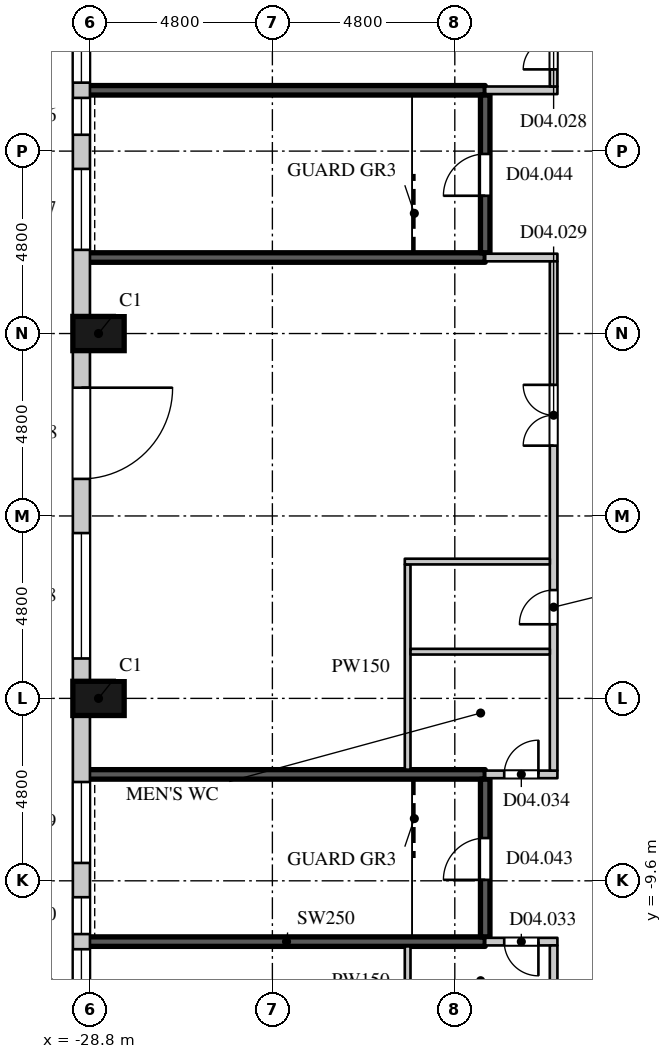
"""IFC4 building model, lengths in metres.
Left out: names, types, materials, properties, quantities, classifications, styles, units other than length and angle.
Written with IfcOpenShell. Run it as: python <this file> out.ifc"""

import sys

from ifc_helpers import new_model, si_unit, direction, frame, frame_2d, origin, origin_2d, place, context, subcontext, project, spatial, rectangle, extrude, element, fill, save


model = new_model("IFC4")
c1 = context("Model", 3, precision=1e-05, world=origin(), true_north=direction((0.0, 1.0)))
c2 = subcontext(c1, "Body", "Model", "MODEL_VIEW")
j1 = project(units=[si_unit("LENGTHUNIT", "METRE"), si_unit("PLANEANGLEUNIT", "RADIAN")], contexts=[c1])
p1 = place(None, origin())
s1 = spatial("IfcSite", under=j1, at=p1, CompositionType="ELEMENT")
p2 = place(p1, origin())
s2 = spatial("IfcBuilding", under=s1, at=p2, CompositionType="ELEMENT")
p3 = place(p2, frame((0.0, 0.0, 21.0)))
s3 = spatial("IfcBuildingStorey", under=s2, at=p3, CompositionType="ELEMENT", Elevation=21.0)
for number, where, z_axis, x_axis in (
    (1, (-28.575, 4.8, 0.0), (0.0, 0.0, 1.0), (0.0, -1.0, 0.0)),
    (2, (-28.575, -4.8, 0.0), (0.0, 0.0, 1.0), (0.0, -1.0, 0.0)),
):
    element("IfcColumn", number, at=place(p3, frame(where, z_axis=z_axis, x_axis=x_axis)), inside=s3, PredefinedType="COLUMN", context=c2, shape_type="SweptSolid", body=[
        extrude(rectangle(XDim=0.9, YDim=1.35, at=origin_2d()), origin(), (0.0, 0.0, 1.0), 4.5),
    ])
p4 = place(p3, frame((-29.025, 13.913, 0.9), z_axis=(0.0, 0.0, 1.0), x_axis=(0.0, -1.0, 0.0)))
e3 = element("IfcWall", 3, at=p4, inside=s3, PredefinedType="ELEMENTEDWALL", context=c2, shape_type="SweptSolid", body=[
    extrude(rectangle(XDim=8.663, YDim=0.45, at=frame_2d((4.332, 0.0))), origin(), (0.0, 0.0, 1.0), 3.3),
])
p5 = place(p4, frame((0.582, 0.0, 0.15)))
e4 = element("IfcOpeningElement", 4, at=p5, cuts=e3, PredefinedType="OPENING", context=c2, shape_type="SweptSolid", body=[
    extrude(rectangle(XDim=1.93, YDim=2.7, at=frame_2d((0.965, 1.35))), frame((0.0, 0.235, 0.0), z_axis=(0.0, -1.0, 0.0), x_axis=(1.0, 0.0, 0.0)), (0.0, 0.0, 1.0), 0.47),
])
p6 = place(p4, frame((2.913, 0.0, 0.15)))
e5 = element("IfcOpeningElement", 5, at=p6, cuts=e3, PredefinedType="OPENING", context=c2, shape_type="SweptSolid", body=[
    extrude(rectangle(XDim=0.97, YDim=2.7, at=frame_2d((0.485, 1.35))), frame((0.0, 0.235, 0.0), z_axis=(0.0, -1.0, 0.0), x_axis=(1.0, 0.0, 0.0)), (0.0, 0.0, 1.0), 0.47),
])
p7 = place(p4, frame((4.781, 0.0, 0.15)))
e6 = element("IfcOpeningElement", 6, at=p7, cuts=e3, PredefinedType="OPENING", context=c2, shape_type="SweptSolid", body=[
    extrude(rectangle(XDim=2.13, YDim=2.7, at=frame_2d((1.065, 1.35))), frame((0.0, 0.235, 0.0), z_axis=(0.0, -1.0, 0.0), x_axis=(1.0, 0.0, 0.0)), (0.0, 0.0, 1.0), 0.47),
])
p8 = place(p3, frame((-29.025, 4.35, 0.0), z_axis=(0.0, 0.0, 1.0), x_axis=(0.0, -1.0, 0.0)))
e7 = element("IfcWall", 7, at=p8, inside=s3, PredefinedType="ELEMENTEDWALL", context=c2, shape_type="SweptSolid", body=[
    extrude(rectangle(XDim=8.7, YDim=0.45, at=frame_2d((4.35, 0.0))), origin(), (0.0, 0.0, 1.0), 4.2),
])
p9 = place(p8, frame((0.975, 0.0, 0.0)))
e8 = element("IfcOpeningElement", 8, at=p9, cuts=e7, PredefinedType="OPENING", context=c2, shape_type="SweptSolid", body=[
    extrude(rectangle(XDim=2.4, YDim=2.7, at=frame_2d((1.2, 1.35))), frame((0.0, 0.235, 0.0), z_axis=(0.0, -1.0, 0.0), x_axis=(1.0, 0.0, 0.0)), (0.0, 0.0, 1.0), 0.47),
])
p10 = place(p8, frame((4.8, 0.0, 1.05)))
e9 = element("IfcOpeningElement", 9, at=p10, cuts=e7, PredefinedType="OPENING", context=c2, shape_type="SweptSolid", body=[
    extrude(rectangle(XDim=3.3, YDim=2.7, at=frame_2d((1.65, 1.35))), frame((0.0, 0.235, 0.0), z_axis=(0.0, -1.0, 0.0), x_axis=(1.0, 0.0, 0.0)), (0.0, 0.0, 1.0), 0.47),
])
p11 = place(p3, frame((-29.025, -5.25, 0.9), z_axis=(0.0, 0.0, 1.0), x_axis=(0.0, -1.0, 0.0)))
e10 = element("IfcWall", 10, at=p11, inside=s3, PredefinedType="ELEMENTEDWALL", context=c2, shape_type="SweptSolid", body=[
    extrude(rectangle(XDim=8.663, YDim=0.45, at=frame_2d((4.332, 0.0))), origin(), (0.0, 0.0, 1.0), 3.3),
])
p12 = place(p11, frame((1.75, 0.0, 0.15)))
e11 = element("IfcOpeningElement", 11, at=p12, cuts=e10, PredefinedType="OPENING", context=c2, shape_type="SweptSolid", body=[
    extrude(rectangle(XDim=2.13, YDim=2.7, at=frame_2d((1.065, 1.35))), frame((0.0, 0.235, 0.0), z_axis=(0.0, -1.0, 0.0), x_axis=(1.0, 0.0, 0.0)), (0.0, 0.0, 1.0), 0.47),
])
p13 = place(p11, frame((4.781, 0.0, 0.15)))
e12 = element("IfcOpeningElement", 12, at=p13, cuts=e10, PredefinedType="OPENING", context=c2, shape_type="SweptSolid", body=[
    extrude(rectangle(XDim=0.97, YDim=2.7, at=frame_2d((0.485, 1.35))), frame((0.0, 0.235, 0.0), z_axis=(0.0, -1.0, 0.0), x_axis=(1.0, 0.0, 0.0)), (0.0, 0.0, 1.0), 0.47),
])
p14 = place(p11, frame((6.15, 0.0, 0.15)))
e13 = element("IfcOpeningElement", 13, at=p14, cuts=e10, PredefinedType="OPENING", context=c2, shape_type="SweptSolid", body=[
    extrude(rectangle(XDim=1.93, YDim=2.7, at=frame_2d((0.965, 1.35))), frame((0.0, 0.235, 0.0), z_axis=(0.0, -1.0, 0.0), x_axis=(1.0, 0.0, 0.0)), (0.0, 0.0, 1.0), 0.47),
])
p15 = place(p3, frame((-18.4, -11.2, 0.0), z_axis=(0.0, 0.0, 1.0), x_axis=(1.0, 0.0, 0.0)))
e14 = element("IfcWall", 14, at=p15, inside=s3, PredefinedType="PARTITIONING", context=c2, shape_type="SweptSolid", body=[
    extrude(rectangle(XDim=1.9, YDim=0.2, at=frame_2d((0.95, 0.0))), origin(), (0.0, 0.0, 1.0), 3.55),
])
p16 = place(p15, frame((0.5, 0.0, 0.0)))
e15 = element("IfcOpeningElement", 15, at=p16, cuts=e14, PredefinedType="OPENING", context=c2, shape_type="SweptSolid", body=[
    extrude(rectangle(XDim=0.9, YDim=2.2, at=frame_2d((0.45, 1.1))), frame((0.0, 0.11, 0.0), z_axis=(0.0, -1.0, 0.0), x_axis=(1.0, 0.0, 0.0)), (0.0, 0.0, 1.0), 0.22),
])
p17 = place(p3, frame((-18.4, -6.8, 0.0), z_axis=(0.0, 0.0, 1.0), x_axis=(1.0, 0.0, 0.0)))
e16 = element("IfcWall", 16, at=p17, inside=s3, PredefinedType="PARTITIONING", context=c2, shape_type="SweptSolid", body=[
    extrude(rectangle(XDim=1.9, YDim=0.2, at=frame_2d((0.95, 0.0))), origin(), (0.0, 0.0, 1.0), 4.25),
])
p18 = place(p17, frame((0.5, 0.0, 0.0)))
e17 = element("IfcOpeningElement", 17, at=p18, cuts=e16, PredefinedType="OPENING", context=c2, shape_type="SweptSolid", body=[
    extrude(rectangle(XDim=0.9, YDim=2.2, at=frame_2d((0.45, 1.1))), frame((0.0, 0.11, 0.0), z_axis=(0.0, -1.0, 0.0), x_axis=(1.0, 0.0, 0.0)), (0.0, 0.0, 1.0), 0.22),
])
p19 = place(p3, frame((-18.4, 6.8, 0.0), z_axis=(0.0, 0.0, 1.0), x_axis=(1.0, 0.0, 0.0)))
e18 = element("IfcWall", 18, at=p19, inside=s3, PredefinedType="PARTITIONING", context=c2, shape_type="SweptSolid", body=[
    extrude(rectangle(XDim=1.9, YDim=0.2, at=frame_2d((0.95, 0.0))), origin(), (0.0, 0.0, 1.0), 4.25),
])
p20 = place(p3, frame((-18.4, 11.2, 0.0), z_axis=(0.0, 0.0, 1.0), x_axis=(1.0, 0.0, 0.0)))
e19 = element("IfcWall", 19, at=p20, inside=s3, PredefinedType="PARTITIONING", context=c2, shape_type="SweptSolid", body=[
    extrude(rectangle(XDim=1.9, YDim=0.2, at=frame_2d((0.95, 0.0))), origin(), (0.0, 0.0, 1.0), 3.55),
])
p21 = place(p3, frame((-16.6, -13.914, 0.0), z_axis=(0.0, 0.0, 1.0), x_axis=(0.0, 1.0, 0.0)))
e20 = element("IfcWall", 20, at=p21, inside=s3, PredefinedType="PARTITIONING", context=c2, shape_type="SweptSolid", body=[
    extrude(rectangle(XDim=2.614, YDim=0.2, at=frame_2d((1.307, 0.0))), origin(), (0.0, 0.0, 1.0), 4.25),
])
p22 = place(p3, frame((-16.6, -6.7, 0.0), z_axis=(0.0, 0.0, 1.0), x_axis=(0.0, 1.0, 0.0)))
e21 = element("IfcWall", 21, at=p22, inside=s3, PredefinedType="PARTITIONING", context=c2, shape_type="SweptSolid", body=[
    extrude(rectangle(XDim=13.4, YDim=0.2, at=frame_2d((6.7, 0.0))), origin(), (0.0, 0.0, 1.0), 4.25),
])
p23 = place(p22, frame((8.55, 0.0, 0.0)))
e22 = element("IfcOpeningElement", 22, at=p23, cuts=e21, PredefinedType="OPENING", context=c2, shape_type="SweptSolid", body=[
    extrude(rectangle(XDim=1.6, YDim=2.4, at=frame_2d((0.8, 1.2))), frame((0.0, 0.11, 0.0), z_axis=(0.0, -1.0, 0.0), x_axis=(1.0, 0.0, 0.0)), (0.0, 0.0, 1.0), 0.22),
])
p24 = place(p22, frame((3.85, 0.0, 0.0)))
e23 = element("IfcOpeningElement", 23, at=p24, cuts=e21, PredefinedType="OPENING", context=c2, shape_type="SweptSolid", body=[
    extrude(rectangle(XDim=0.9, YDim=2.2, at=frame_2d((0.45, 1.1))), frame((0.0, 0.11, 0.0), z_axis=(0.0, -1.0, 0.0), x_axis=(1.0, 0.0, 0.0)), (0.0, 0.0, 1.0), 0.22),
])
p25 = place(p3, frame((-16.6, 11.3, 0.0), z_axis=(0.0, 0.0, 1.0), x_axis=(0.0, 1.0, 0.0)))
e24 = element("IfcWall", 24, at=p25, inside=s3, PredefinedType="PARTITIONING", context=c2, shape_type="SweptSolid", body=[
    extrude(rectangle(XDim=2.513, YDim=0.2, at=frame_2d((1.257, 0.0))), origin(), (0.0, 0.0, 1.0), 4.25),
])
p26 = place(p25, frame((0.45, 0.0, 0.0)))
e25 = element("IfcOpeningElement", 25, at=p26, cuts=e24, PredefinedType="OPENING", context=c2, shape_type="SweptSolid", body=[
    extrude(rectangle(XDim=1.6, YDim=2.4, at=frame_2d((0.8, 1.2))), frame((0.0, 0.11, 0.0), z_axis=(0.0, -1.0, 0.0), x_axis=(1.0, 0.0, 0.0)), (0.0, 0.0, 1.0), 0.22),
])
p27 = place(p3, frame((-20.441, -13.182, 0.0), z_axis=(0.0, 0.0, 1.0), x_axis=(0.0, 1.0, 0.0)))
e26 = element("IfcWall", 26, at=p27, inside=s3, PredefinedType="PARTITIONING", context=c2, shape_type="SweptSolid", body=[
    extrude(rectangle(XDim=1.857, YDim=0.15, at=frame_2d((0.928, 0.0))), origin(), (0.0, 0.0, 1.0), 4.25),
])
p28 = place(p3, frame((-20.441, -6.675, 0.0), z_axis=(0.0, 0.0, 1.0), x_axis=(0.0, 1.0, 0.0)))
e27 = element("IfcWall", 27, at=p28, inside=s3, PredefinedType="PARTITIONING", context=c2, shape_type="SweptSolid", body=[
    extrude(rectangle(XDim=5.4, YDim=0.15, at=frame_2d((2.7, 0.0))), origin(), (0.0, 0.0, 1.0), 4.25),
])
p29 = place(p3, frame((-20.366, -3.571, 0.0), z_axis=(0.0, 0.0, 1.0), x_axis=(1.0, 0.0, 0.0)))
e28 = element("IfcWall", 28, at=p29, inside=s3, PredefinedType="PARTITIONING", context=c2, shape_type="SweptSolid", body=[
    extrude(rectangle(XDim=3.666, YDim=0.15, at=frame_2d((1.833, 0.0))), origin(), (0.0, 0.0, 1.0), 4.25),
])
p30 = place(p3, frame((-20.516, -1.2, 0.0), z_axis=(0.0, 0.0, 1.0), x_axis=(1.0, 0.0, 0.0)))
e29 = element("IfcWall", 29, at=p30, inside=s3, PredefinedType="PARTITIONING", context=c2, shape_type="SweptSolid", body=[
    extrude(rectangle(XDim=3.816, YDim=0.15, at=frame_2d((1.908, 0.0))), origin(), (0.0, 0.0, 1.0), 4.25),
])
for number, where, z_axis, x_axis in (
    (30, (-28.855, -11.2, 0.0), (0.0, 0.0, 1.0), (1.0, 0.0, 0.0)),
    (31, (-28.855, -6.8, 0.0), (0.0, 0.0, 1.0), (1.0, 0.0, 0.0)),
    (32, (-28.855, 6.8, 0.0), (0.0, 0.0, 1.0), (1.0, 0.0, 0.0)),
    (33, (-28.855, 11.2, 0.0), (0.0, 0.0, 1.0), (1.0, 0.0, 0.0)),
):
    element("IfcWall", number, at=place(p3, frame(where, z_axis=z_axis, x_axis=x_axis)), inside=s3, PredefinedType="SHEAR", context=c2, shape_type="SweptSolid", body=[
        extrude(rectangle(XDim=10.455, YDim=0.25, at=frame_2d((5.228, 0.0))), origin(), (0.0, 0.0, 1.0), 4.25),
    ])
p31 = place(p3, frame((-18.4, -11.075, 0.0), z_axis=(0.0, 0.0, 1.0), x_axis=(0.0, 1.0, 0.0)))
e34 = element("IfcWall", 34, at=p31, inside=s3, PredefinedType="SHEAR", context=c2, shape_type="SweptSolid", body=[
    extrude(rectangle(XDim=4.15, YDim=0.25, at=frame_2d((2.075, 0.0))), origin(), (0.0, 0.0, 1.0), 4.25),
])
p32 = place(p31, frame((1.5, 0.0, 0.0)))
e35 = element("IfcOpeningElement", 35, at=p32, cuts=e34, PredefinedType="OPENING", context=c2, shape_type="SweptSolid", body=[
    extrude(rectangle(XDim=1.1, YDim=2.2, at=frame_2d((0.55, 1.1))), frame((0.0, 0.135, 0.0), z_axis=(0.0, -1.0, 0.0), x_axis=(1.0, 0.0, 0.0)), (0.0, 0.0, 1.0), 0.27),
])
p33 = place(p3, frame((-18.4, 6.925, 0.0), z_axis=(0.0, 0.0, 1.0), x_axis=(0.0, 1.0, 0.0)))
e36 = element("IfcWall", 36, at=p33, inside=s3, PredefinedType="SHEAR", context=c2, shape_type="SweptSolid", body=[
    extrude(rectangle(XDim=4.15, YDim=0.25, at=frame_2d((2.075, 0.0))), origin(), (0.0, 0.0, 1.0), 4.25),
])
p34 = place(p33, frame((1.5, 0.0, 0.0)))
e37 = element("IfcOpeningElement", 37, at=p34, cuts=e36, PredefinedType="OPENING", context=c2, shape_type="SweptSolid", body=[
    extrude(rectangle(XDim=1.1, YDim=2.2, at=frame_2d((0.55, 1.1))), frame((0.0, 0.135, 0.0), z_axis=(0.0, -1.0, 0.0), x_axis=(1.0, 0.0, 0.0)), (0.0, 0.0, 1.0), 0.27),
])
p35 = place(p5, origin())
e38 = element("IfcWindow", 38, at=p35, inside=s3, PartitioningType="SINGLE_PANEL", PredefinedType="WINDOW", context=c2, shape_type="SweptSolid", body=[
    extrude(rectangle(XDim=1.93, YDim=2.7, at=frame_2d((0.965, 1.35))), frame((0.0, 0.135, 0.0), z_axis=(0.0, -1.0, 0.0), x_axis=(1.0, 0.0, 0.0)), (0.0, 0.0, 1.0), 0.06),
])
fill(e4, e38)
p36 = place(p6, origin())
e39 = element("IfcWindow", 39, at=p36, inside=s3, PartitioningType="SINGLE_PANEL", PredefinedType="WINDOW", context=c2, shape_type="SweptSolid", body=[
    extrude(rectangle(XDim=0.97, YDim=2.7, at=frame_2d((0.485, 1.35))), frame((0.0, 0.135, 0.0), z_axis=(0.0, -1.0, 0.0), x_axis=(1.0, 0.0, 0.0)), (0.0, 0.0, 1.0), 0.06),
])
fill(e5, e39)
p37 = place(p7, origin())
e40 = element("IfcWindow", 40, at=p37, inside=s3, PartitioningType="SINGLE_PANEL", PredefinedType="WINDOW", context=c2, shape_type="SweptSolid", body=[
    extrude(rectangle(XDim=2.13, YDim=2.7, at=frame_2d((1.065, 1.35))), frame((0.0, 0.135, 0.0), z_axis=(0.0, -1.0, 0.0), x_axis=(1.0, 0.0, 0.0)), (0.0, 0.0, 1.0), 0.06),
])
fill(e6, e40)
p38 = place(p9, origin())
e41 = element("IfcDoor", 41, at=p38, inside=s3, OperationType="SINGLE_SWING_LEFT", PredefinedType="DOOR", context=c2, shape_type="SweptSolid", body=[
    extrude(rectangle(XDim=2.4, YDim=2.7, at=frame_2d((1.2, 1.35))), frame((0.0, 0.13, 0.0), z_axis=(0.0, -1.0, 0.0), x_axis=(1.0, 0.0, 0.0)), (0.0, 0.0, 1.0), 0.05),
])
fill(e8, e41)
p39 = place(p10, origin())
e42 = element("IfcWindow", 42, at=p39, inside=s3, PartitioningType="SINGLE_PANEL", PredefinedType="WINDOW", context=c2, shape_type="SweptSolid", body=[
    extrude(rectangle(XDim=3.3, YDim=2.7, at=frame_2d((1.65, 1.35))), frame((0.0, 0.135, 0.0), z_axis=(0.0, -1.0, 0.0), x_axis=(1.0, 0.0, 0.0)), (0.0, 0.0, 1.0), 0.06),
])
fill(e9, e42)
p40 = place(p12, origin())
e43 = element("IfcWindow", 43, at=p40, inside=s3, PartitioningType="SINGLE_PANEL", PredefinedType="WINDOW", context=c2, shape_type="SweptSolid", body=[
    extrude(rectangle(XDim=2.13, YDim=2.7, at=frame_2d((1.065, 1.35))), frame((0.0, 0.135, 0.0), z_axis=(0.0, -1.0, 0.0), x_axis=(1.0, 0.0, 0.0)), (0.0, 0.0, 1.0), 0.06),
])
fill(e11, e43)
p41 = place(p13, origin())
e44 = element("IfcWindow", 44, at=p41, inside=s3, PartitioningType="SINGLE_PANEL", PredefinedType="WINDOW", context=c2, shape_type="SweptSolid", body=[
    extrude(rectangle(XDim=0.97, YDim=2.7, at=frame_2d((0.485, 1.35))), frame((0.0, 0.135, 0.0), z_axis=(0.0, -1.0, 0.0), x_axis=(1.0, 0.0, 0.0)), (0.0, 0.0, 1.0), 0.06),
])
fill(e12, e44)
p42 = place(p14, origin())
e45 = element("IfcWindow", 45, at=p42, inside=s3, PartitioningType="SINGLE_PANEL", PredefinedType="WINDOW", context=c2, shape_type="SweptSolid", body=[
    extrude(rectangle(XDim=1.93, YDim=2.7, at=frame_2d((0.965, 1.35))), frame((0.0, 0.135, 0.0), z_axis=(0.0, -1.0, 0.0), x_axis=(1.0, 0.0, 0.0)), (0.0, 0.0, 1.0), 0.06),
])
fill(e13, e45)
p43 = place(p26, origin())
e46 = element("IfcDoor", 46, at=p43, inside=s3, OperationType="DOUBLE_DOOR_SINGLE_SWING", PredefinedType="DOOR", context=c2, shape_type="SweptSolid", body=[
    extrude(rectangle(XDim=1.6, YDim=2.4, at=frame_2d((0.8, 1.2))), frame((0.0, 0.025, 0.0), z_axis=(0.0, -1.0, 0.0), x_axis=(1.0, 0.0, 0.0)), (0.0, 0.0, 1.0), 0.05),
])
fill(e25, e46)
p44 = place(p23, origin())
e47 = element("IfcDoor", 47, at=p44, inside=s3, OperationType="DOUBLE_DOOR_SINGLE_SWING", PredefinedType="DOOR", context=c2, shape_type="SweptSolid", body=[
    extrude(rectangle(XDim=1.6, YDim=2.4, at=frame_2d((0.8, 1.2))), frame((0.0, 0.025, 0.0), z_axis=(0.0, -1.0, 0.0), x_axis=(1.0, 0.0, 0.0)), (0.0, 0.0, 1.0), 0.05),
])
fill(e22, e47)
p45 = place(p16, origin())
e48 = element("IfcDoor", 48, at=p45, inside=s3, OperationType="SINGLE_SWING_LEFT", PredefinedType="DOOR", context=c2, shape_type="SweptSolid", body=[
    extrude(rectangle(XDim=0.9, YDim=2.2, at=frame_2d((0.45, 1.1))), frame((0.0, 0.025, 0.0), z_axis=(0.0, -1.0, 0.0), x_axis=(1.0, 0.0, 0.0)), (0.0, 0.0, 1.0), 0.05),
])
fill(e15, e48)
p46 = place(p18, origin())
e49 = element("IfcDoor", 49, at=p46, inside=s3, OperationType="SINGLE_SWING_RIGHT", PredefinedType="DOOR", context=c2, shape_type="SweptSolid", body=[
    extrude(rectangle(XDim=0.9, YDim=2.2, at=frame_2d((0.45, 1.1))), frame((0.0, 0.025, 0.0), z_axis=(0.0, -1.0, 0.0), x_axis=(1.0, 0.0, 0.0)), (0.0, 0.0, 1.0), 0.05),
])
fill(e17, e49)
p47 = place(p24, origin())
e50 = element("IfcDoor", 50, at=p47, inside=s3, OperationType="SINGLE_SWING_LEFT", PredefinedType="DOOR", context=c2, shape_type="SweptSolid", body=[
    extrude(rectangle(XDim=0.9, YDim=2.2, at=frame_2d((0.45, 1.1))), frame((0.0, 0.025, 0.0), z_axis=(0.0, -1.0, 0.0), x_axis=(1.0, 0.0, 0.0)), (0.0, 0.0, 1.0), 0.05),
])
fill(e23, e50)
p48 = place(p32, origin())
e51 = element("IfcDoor", 51, at=p48, inside=s3, OperationType="SINGLE_SWING_LEFT", PredefinedType="DOOR", context=c2, shape_type="SweptSolid", body=[
    extrude(rectangle(XDim=1.1, YDim=2.2, at=frame_2d((0.55, 1.1))), frame((0.0, 0.025, 0.0), z_axis=(0.0, -1.0, 0.0), x_axis=(1.0, 0.0, 0.0)), (0.0, 0.0, 1.0), 0.05),
])
fill(e35, e51)
p49 = place(p34, origin())
e52 = element("IfcDoor", 52, at=p49, inside=s3, OperationType="SINGLE_SWING_LEFT", PredefinedType="DOOR", context=c2, shape_type="SweptSolid", body=[
    extrude(rectangle(XDim=1.1, YDim=2.2, at=frame_2d((0.55, 1.1))), frame((0.0, 0.025, 0.0), z_axis=(0.0, -1.0, 0.0), x_axis=(1.0, 0.0, 0.0)), (0.0, 0.0, 1.0), 0.05),
])
fill(e37, e52)
save(model, sys.argv[1])
